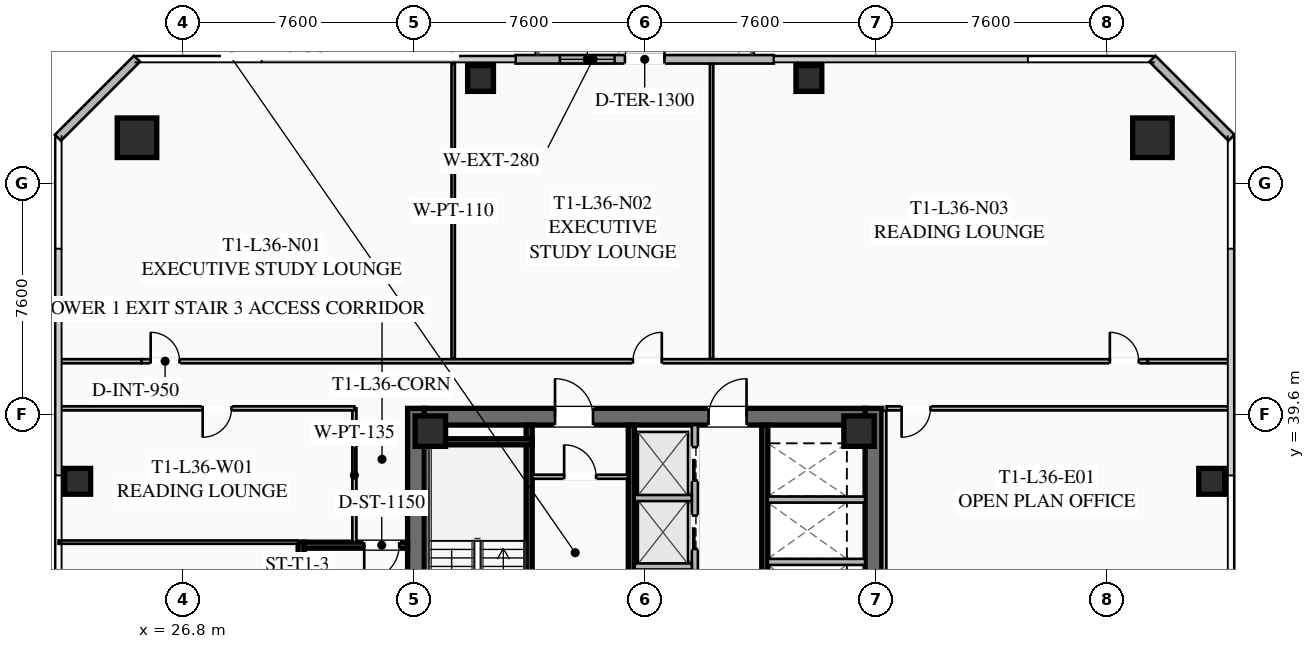
"""IFC4 building model, lengths in metres.
Left out: names, types, materials, properties, quantities, classifications, styles, units other than length and angle.
Written with IfcOpenShell. Run it as: python <this file> out.ifc"""

import sys

from ifc_helpers import new_model, si_unit, direction, frame, frame_2d, origin, origin_2d, place, context, subcontext, project, spatial, rectangle, hollow_rectangle, extrude, element, fill, save


model = new_model("IFC4")
c1 = context("Model", 3, precision=1e-05, world=origin(), true_north=direction((0.0, 1.0)))
c2 = subcontext(c1, "Body", "Model", "MODEL_VIEW")
j1 = project(units=[si_unit("LENGTHUNIT", "METRE"), si_unit("PLANEANGLEUNIT", "RADIAN")], contexts=[c1])
p1 = place(None, origin())
s1 = spatial("IfcSite", under=j1, at=p1, CompositionType="ELEMENT")
p2 = place(p1, origin())
s2 = spatial("IfcBuilding", under=s1, at=p2, CompositionType="ELEMENT")
p3 = place(p2, frame((0.0, 0.0, 135.7)))
s3 = spatial("IfcBuildingStorey", under=s2, at=p3, CompositionType="ELEMENT", Elevation=135.7)
for number, where, z_axis, x_axis in (
    (1, (34.475, 24.2, 0.0), (0.0, 0.0, 1.0), (0.0, 1.0, 0.0)),
    (2, (49.525, 39.8, 0.0), (0.0, 0.0, 1.0), (0.0, -1.0, 0.0)),
):
    element("IfcWall", number, at=place(p3, frame(where, z_axis=z_axis, x_axis=x_axis)), inside=s3, PredefinedType="SHEAR", context=c2, shape_type="SweptSolid", body=[
        extrude(rectangle(XDim=15.6, YDim=0.55, at=frame_2d((7.8, 0.0))), origin(), (0.0, 0.0, 1.0), 3.55),
    ])
p4 = place(p3, frame((34.75, 39.525, 0.0), z_axis=(0.0, 0.0, 1.0), x_axis=(1.0, 0.0, 0.0)))
e3 = element("IfcWall", 3, at=p4, inside=s3, PredefinedType="SHEAR", context=c2, shape_type="SweptSolid", body=[
    extrude(rectangle(XDim=14.5, YDim=0.55, at=frame_2d((7.25, 0.0))), origin(), (0.0, 0.0, 1.0), 3.55),
])
p5 = place(p4, frame((4.3, 0.0, 0.0)))
e4 = element("IfcOpeningElement", 4, at=p5, cuts=e3, PredefinedType="OPENING", context=c2, shape_type="SweptSolid", body=[
    extrude(rectangle(XDim=1.25, YDim=2.25, at=frame_2d((0.625, 1.125))), frame((0.0, 0.285, 0.0), z_axis=(0.0, -1.0, 0.0), x_axis=(1.0, 0.0, 0.0)), (0.0, 0.0, 1.0), 0.57),
])
p6 = place(p4, frame((9.35, 0.0, 0.0)))
e5 = element("IfcOpeningElement", 5, at=p6, cuts=e3, PredefinedType="OPENING", context=c2, shape_type="SweptSolid", body=[
    extrude(rectangle(XDim=1.25, YDim=2.25, at=frame_2d((0.625, 1.125))), frame((0.0, 0.285, 0.0), z_axis=(0.0, -1.0, 0.0), x_axis=(1.0, 0.0, 0.0)), (0.0, 0.0, 1.0), 0.57),
])
for number, where, z_axis, x_axis in (
    (6, (49.05, 39.05, 0.0), (0.0, 0.0, 1.0), (1.0, 0.0, 0.0)),
    (7, (34.95, 39.05, 0.0), (0.0, 0.0, 1.0), (1.0, 0.0, 0.0)),
):
    element("IfcColumn", number, at=place(p3, frame(where, z_axis=z_axis, x_axis=x_axis)), inside=s3, PredefinedType="COLUMN", context=c2, shape_type="SweptSolid", body=[
        extrude(hollow_rectangle(XDim=1.0, YDim=1.0, WallThickness=0.04, at=origin_2d()), origin(), (0.0, 0.0, 1.0), 3.37),
    ])
for number, where, z_axis, x_axis in (
    (8, (58.7, 48.7, 0.0), (0.0, 0.0, 1.0), (1.0, 0.0, 0.0)),
    (9, (25.3, 48.7, 0.0), (0.0, 0.0, 1.0), (1.0, 0.0, 0.0)),
):
    element("IfcColumn", number, at=place(p3, frame(where, z_axis=z_axis, x_axis=x_axis)), inside=s3, PredefinedType="COLUMN", context=c2, shape_type="SweptSolid", body=[
        extrude(hollow_rectangle(XDim=1.3, YDim=1.3, WallThickness=0.05, at=origin_2d()), origin(), (0.0, 0.0, 1.0), 3.37),
    ])
for number, where, z_axis, x_axis in (
    (10, (60.65, 37.4, 0.0), (0.0, 0.0, 1.0), (1.0, 0.0, 0.0)),
    (11, (47.4, 50.65, 0.0), (0.0, 0.0, 1.0), (1.0, 0.0, 0.0)),
    (12, (36.6, 50.65, 0.0), (0.0, 0.0, 1.0), (1.0, 0.0, 0.0)),
    (13, (23.35, 37.4, 0.0), (0.0, 0.0, 1.0), (1.0, 0.0, 0.0)),
):
    element("IfcColumn", number, at=place(p3, frame(where, z_axis=z_axis, x_axis=x_axis)), inside=s3, PredefinedType="COLUMN", context=c2, shape_type="SweptSolid", body=[
        extrude(hollow_rectangle(XDim=0.85, YDim=0.85, WallThickness=0.035, at=origin_2d()), origin(), (0.0, 0.0, 1.0), 3.37),
    ])
p7 = place(p3, frame((37.75, 51.28, 0.0), z_axis=(0.0, 0.0, 1.0), x_axis=(1.0, 0.0, 0.0)))
e14 = element("IfcWall", 14, at=p7, inside=s3, PredefinedType="SOLIDWALL", context=c2, shape_type="SweptSolid", body=[
    extrude(rectangle(XDim=8.5, YDim=0.28, at=frame_2d((4.25, 0.0))), origin(), (0.0, 0.0, 1.0), 3.37),
])
p8 = place(p7, frame((3.6, 0.0, 0.0)))
e15 = element("IfcOpeningElement", 15, at=p8, cuts=e14, PredefinedType="OPENING", context=c2, shape_type="SweptSolid", body=[
    extrude(rectangle(XDim=1.3, YDim=2.15, at=frame_2d((0.65, 1.075))), frame((0.0, 0.15, 0.0), z_axis=(0.0, -1.0, 0.0), x_axis=(1.0, 0.0, 0.0)), (0.0, 0.0, 1.0), 0.3),
])
p9 = place(p7, frame((1.46, 0.0, 0.85)))
e16 = element("IfcOpeningElement", 16, at=p9, cuts=e14, PredefinedType="OPENING", context=c2, shape_type="SweptSolid", body=[
    extrude(rectangle(XDim=1.8, YDim=1.92, at=frame_2d((0.9, 0.96))), frame((0.0, 0.15, 0.0), z_axis=(0.0, -1.0, 0.0), x_axis=(1.0, 0.0, 0.0)), (0.0, 0.0, 1.0), 0.3),
])
for number, where, z_axis, x_axis in (
    (17, (22.7, 48.7, 0.0), (0.0, 0.0, 1.0), (0.707, 0.707, 0.0)),
    (18, (58.7, 51.3, 0.0), (0.0, 0.0, 1.0), (0.707, -0.707, 0.0)),
):
    element("IfcWall", number, at=place(p3, frame(where, z_axis=z_axis, x_axis=x_axis)), inside=s3, PredefinedType="SOLIDWALL", context=c2, shape_type="SweptSolid", body=[
        extrude(rectangle(XDim=3.677, YDim=0.28, at=frame_2d((1.838, 0.0))), origin(), (0.0, 0.0, 1.0), 3.37),
    ])
p10 = place(p3, frame((38.2, 31.2, 0.0), z_axis=(0.0, 0.0, 1.0), x_axis=(0.0, 1.0, 0.0)))
e19 = element("IfcWall", 19, at=p10, inside=s3, PredefinedType="SHEAR", context=c2, shape_type="SweptSolid", body=[
    extrude(rectangle(XDim=8.05, YDim=0.2, at=frame_2d((4.025, 0.0))), origin(), (0.0, 0.0, 1.0), 3.37),
])
p11 = place(p10, frame((0.45, 0.0, 0.0)))
e20 = element("IfcOpeningElement", 20, at=p11, cuts=e19, PredefinedType="OPENING", context=c2, shape_type="SweptSolid", body=[
    extrude(rectangle(XDim=1.15, YDim=2.2, at=frame_2d((0.575, 1.1))), frame((0.0, 0.11, 0.0), z_axis=(0.0, -1.0, 0.0), x_axis=(1.0, 0.0, 0.0)), (0.0, 0.0, 1.0), 0.22),
])
p12 = place(p3, frame((34.75, 38.7, 0.0), z_axis=(0.0, 0.0, 1.0), x_axis=(1.0, 0.0, 0.0)))
e21 = element("IfcWall", 21, at=p12, inside=s3, PredefinedType="SHEAR", context=c2, shape_type="SweptSolid", body=[
    extrude(rectangle(XDim=3.55, YDim=0.2, at=frame_2d((1.775, 0.0))), origin(), (0.0, 0.0, 1.0), 3.37),
])
p13 = place(p3, frame((41.56, 24.75, 0.0), z_axis=(0.0, 0.0, 1.0), x_axis=(0.0, 1.0, 0.0)))
e22 = element("IfcWall", 22, at=p13, inside=s3, PredefinedType="SHEAR", context=c2, shape_type="SweptSolid", body=[
    extrude(rectangle(XDim=14.5, YDim=0.2, at=frame_2d((7.25, 0.0))), origin(), (0.0, 0.0, 1.0), 3.37),
])
p14 = place(p3, frame((45.95, 39.25, 0.0), z_axis=(0.0, 0.0, 1.0), x_axis=(0.0, -1.0, 0.0)))
e23 = element("IfcWall", 23, at=p14, inside=s3, PredefinedType="SHEAR", context=c2, shape_type="SweptSolid", body=[
    extrude(rectangle(XDim=6.45, YDim=0.2, at=frame_2d((3.225, 0.0))), origin(), (0.0, 0.0, 1.0), 3.37),
])
for number, where, z_axis, x_axis in (
    (24, (46.05, 34.75, 0.0), (0.0, 0.0, 1.0), (1.0, 0.0, 0.0)),
    (25, (46.05, 36.8, 0.0), (0.0, 0.0, 1.0), (1.0, 0.0, 0.0)),
):
    element("IfcWall", number, at=place(p3, frame(where, z_axis=z_axis, x_axis=x_axis)), inside=s3, PredefinedType="SOLIDWALL", context=c2, shape_type="SweptSolid", body=[
        extrude(rectangle(XDim=3.2, YDim=0.2, at=frame_2d((1.6, 0.0))), origin(), (0.0, 0.0, 1.0), 3.37),
    ])
p15 = place(p3, frame((38.3, 37.55, 0.0), z_axis=(0.0, 0.0, 1.0), x_axis=(1.0, 0.0, 0.0)))
e26 = element("IfcWall", 26, at=p15, inside=s3, PredefinedType="PARTITIONING", context=c2, shape_type="SweptSolid", body=[
    extrude(rectangle(XDim=3.15, YDim=0.135, at=frame_2d((1.575, 0.0))), origin(), (0.0, 0.0, 1.0), 2.723),
])
p16 = place(p15, frame((1.05, 0.0, 0.0)))
e27 = element("IfcOpeningElement", 27, at=p16, cuts=e26, PredefinedType="OPENING", context=c2, shape_type="SweptSolid", body=[
    extrude(rectangle(XDim=1.05, YDim=2.2, at=frame_2d((0.525, 1.1))), frame((0.0, 0.077, 0.0), z_axis=(0.0, -1.0, 0.0), x_axis=(1.0, 0.0, 0.0)), (0.0, 0.0, 1.0), 0.155),
])
p17 = place(p3, frame((43.65, 32.35, 0.0), z_axis=(0.0, 0.0, 1.0), x_axis=(0.0, 1.0, 0.0)))
e28 = element("IfcWall", 28, at=p17, inside=s3, PredefinedType="SOLIDWALL", context=c2, shape_type="SweptSolid", body=[
    extrude(rectangle(XDim=6.9, YDim=0.2, at=frame_2d((3.45, 0.0))), origin(), (0.0, 0.0, 1.0), 3.37),
])
p18 = place(p17, frame((0.575, 0.0, 0.0)))
e29 = element("IfcOpeningElement", 29, at=p18, cuts=e28, PredefinedType="OPENING", context=c2, shape_type="SweptSolid", body=[
    extrude(rectangle(XDim=1.1, YDim=2.2, at=frame_2d((0.55, 1.1))), frame((0.0, 0.11, 0.0), z_axis=(0.0, -1.0, 0.0), x_axis=(1.0, 0.0, 0.0)), (0.0, 0.0, 1.0), 0.22),
])
p19 = place(p17, frame((2.825, 0.0, 0.0)))
e30 = element("IfcOpeningElement", 30, at=p19, cuts=e28, PredefinedType="OPENING", context=c2, shape_type="SweptSolid", body=[
    extrude(rectangle(XDim=1.1, YDim=2.2, at=frame_2d((0.55, 1.1))), frame((0.0, 0.11, 0.0), z_axis=(0.0, -1.0, 0.0), x_axis=(1.0, 0.0, 0.0)), (0.0, 0.0, 1.0), 0.22),
])
p20 = place(p17, frame((5.075, 0.0, 0.0)))
e31 = element("IfcOpeningElement", 31, at=p20, cuts=e28, PredefinedType="OPENING", context=c2, shape_type="SweptSolid", body=[
    extrude(rectangle(XDim=1.1, YDim=2.2, at=frame_2d((0.55, 1.1))), frame((0.0, 0.11, 0.0), z_axis=(0.0, -1.0, 0.0), x_axis=(1.0, 0.0, 0.0)), (0.0, 0.0, 1.0), 0.22),
])
for number, where, z_axis, x_axis in (
    (32, (41.67, 34.6, 0.0), (0.0, 0.0, 1.0), (1.0, 0.0, 0.0)),
    (33, (41.67, 36.85, 0.0), (0.0, 0.0, 1.0), (1.0, 0.0, 0.0)),
):
    element("IfcWall", number, at=place(p3, frame(where, z_axis=z_axis, x_axis=x_axis)), inside=s3, PredefinedType="SOLIDWALL", context=c2, shape_type="SweptSolid", body=[
        extrude(rectangle(XDim=1.88, YDim=0.2, at=frame_2d((0.94, 0.0))), origin(), (0.0, 0.0, 1.0), 3.37),
    ])
p21 = place(p3, frame((30.7, 28.6, 0.0), z_axis=(0.0, 0.0, 1.0), x_axis=(0.0, 1.0, 0.0)))
e34 = element("IfcWall", 34, at=p21, inside=s3, PredefinedType="SHEAR", context=c2, shape_type="SweptSolid", body=[
    extrude(rectangle(XDim=6.8, YDim=0.2, at=frame_2d((3.4, 0.0))), origin(), (0.0, 0.0, 1.0), 3.37),
])
p22 = place(p3, frame((34.2, 35.3, 0.0), z_axis=(0.0, 0.0, 1.0), x_axis=(-1.0, 0.0, 0.0)))
e35 = element("IfcWall", 35, at=p22, inside=s3, PredefinedType="SHEAR", context=c2, shape_type="SweptSolid", body=[
    extrude(rectangle(XDim=3.4, YDim=0.2, at=frame_2d((1.7, 0.0))), origin(), (0.0, 0.0, 1.0), 3.37),
])
p23 = place(p22, frame((0.275, 0.0, 0.0)))
e36 = element("IfcOpeningElement", 36, at=p23, cuts=e35, PredefinedType="OPENING", context=c2, shape_type="SweptSolid", body=[
    extrude(rectangle(XDim=1.15, YDim=2.2, at=frame_2d((0.575, 1.1))), frame((0.0, 0.11, 0.0), z_axis=(0.0, -1.0, 0.0), x_axis=(1.0, 0.0, 0.0)), (0.0, 0.0, 1.0), 0.22),
])
p24 = place(p3, frame((32.45, 35.4, 0.0), z_axis=(0.0, 0.0, 1.0), x_axis=(0.0, 1.0, 0.0)))
e37 = element("IfcWall", 37, at=p24, inside=s3, PredefinedType="PARTITIONING", context=c2, shape_type="SweptSolid", body=[
    extrude(rectangle(XDim=4.4, YDim=0.135, at=frame_2d((2.2, 0.0))), origin(), (0.0, 0.0, 1.0), 2.723),
])
p25 = place(p3, frame((25.45, 41.35, 0.0), z_axis=(0.0, 0.0, 1.0), x_axis=(1.0, 0.0, 0.0)))
e38 = element("IfcWall", 38, at=p25, inside=s3, PredefinedType="PARTITIONING", context=c2, shape_type="SweptSolid", body=[
    extrude(rectangle(XDim=33.1, YDim=0.135, at=frame_2d((16.55, 0.0))), origin(), (0.0, 0.0, 1.0), 2.723),
])
p26 = place(p25, frame((0.3, 0.0, 0.0)))
e39 = element("IfcOpeningElement", 39, at=p26, cuts=e38, PredefinedType="OPENING", context=c2, shape_type="SweptSolid", body=[
    extrude(rectangle(XDim=0.95, YDim=2.05, at=frame_2d((0.475, 1.025))), frame((0.0, 0.077, 0.0), z_axis=(0.0, -1.0, 0.0), x_axis=(1.0, 0.0, 0.0)), (0.0, 0.0, 1.0), 0.155),
])
p27 = place(p25, frame((16.163, 0.0, 0.0)))
e40 = element("IfcOpeningElement", 40, at=p27, cuts=e38, PredefinedType="OPENING", context=c2, shape_type="SweptSolid", body=[
    extrude(rectangle(XDim=0.95, YDim=2.05, at=frame_2d((0.475, 1.025))), frame((0.0, 0.077, 0.0), z_axis=(0.0, -1.0, 0.0), x_axis=(1.0, 0.0, 0.0)), (0.0, 0.0, 1.0), 0.155),
])
p28 = place(p25, frame((31.85, 0.0, 0.0)))
e41 = element("IfcOpeningElement", 41, at=p28, cuts=e38, PredefinedType="OPENING", context=c2, shape_type="SweptSolid", body=[
    extrude(rectangle(XDim=0.95, YDim=2.05, at=frame_2d((0.475, 1.025))), frame((0.0, 0.077, 0.0), z_axis=(0.0, -1.0, 0.0), x_axis=(1.0, 0.0, 0.0)), (0.0, 0.0, 1.0), 0.155),
])
for number, where, z_axis, x_axis in (
    (42, (22.72, 41.35, 0.0), (0.0, 0.0, 1.0), (1.0, 0.0, 0.0)),
    (43, (58.55, 41.35, 0.0), (0.0, 0.0, 1.0), (1.0, 0.0, 0.0)),
):
    element("IfcWall", number, at=place(p3, frame(where, z_axis=z_axis, x_axis=x_axis)), inside=s3, PredefinedType="PARTITIONING", context=c2, shape_type="SweptSolid", body=[
        extrude(rectangle(XDim=2.73, YDim=0.135, at=frame_2d((1.365, 0.0))), origin(), (0.0, 0.0, 1.0), 2.723),
    ])
for number, where, z_axis, x_axis in (
    (44, (35.7, 41.43, 0.0), (0.0, 0.0, 1.0), (0.0, 1.0, 0.0)),
    (45, (44.2, 41.43, 0.0), (0.0, 0.0, 1.0), (0.0, 1.0, 0.0)),
):
    element("IfcWall", number, at=place(p3, frame(where, z_axis=z_axis, x_axis=x_axis)), inside=s3, PredefinedType="PARTITIONING", context=c2, shape_type="SweptSolid", body=[
        extrude(rectangle(XDim=9.7, YDim=0.11, at=frame_2d((4.85, 0.0))), origin(), (0.0, 0.0, 1.0), 2.723),
    ])
p29 = place(p3, frame((49.88, 39.72, 0.0), z_axis=(0.0, 0.0, 1.0), x_axis=(0.0, -1.0, 0.0)))
e46 = element("IfcWall", 46, at=p29, inside=s3, PredefinedType="PARTITIONING", context=c2, shape_type="SweptSolid", body=[
    extrude(rectangle(XDim=15.44, YDim=0.135, at=frame_2d((7.72, 0.0))), origin(), (0.0, 0.0, 1.0), 2.723),
])
p30 = place(p3, frame((61.28, 39.8, 0.0), z_axis=(0.0, 0.0, 1.0), x_axis=(-1.0, 0.0, 0.0)))
e47 = element("IfcWall", 47, at=p30, inside=s3, PredefinedType="PARTITIONING", context=c2, shape_type="SweptSolid", body=[
    extrude(rectangle(XDim=11.32, YDim=0.135, at=frame_2d((5.66, 0.0))), origin(), (0.0, 0.0, 1.0), 2.723),
])
p31 = place(p30, frame((9.88, 0.0, 0.0)))
e48 = element("IfcOpeningElement", 48, at=p31, cuts=e47, PredefinedType="OPENING", context=c2, shape_type="SweptSolid", body=[
    extrude(rectangle(XDim=0.95, YDim=2.05, at=frame_2d((0.475, 1.025))), frame((0.0, 0.077, 0.0), z_axis=(0.0, -1.0, 0.0), x_axis=(1.0, 0.0, 0.0)), (0.0, 0.0, 1.0), 0.155),
])
p32 = place(p3, frame((32.45, 39.8, 0.0), z_axis=(0.0, 0.0, 1.0), x_axis=(-1.0, 0.0, 0.0)))
e49 = element("IfcWall", 49, at=p32, inside=s3, PredefinedType="PARTITIONING", context=c2, shape_type="SweptSolid", body=[
    extrude(rectangle(XDim=9.73, YDim=0.135, at=frame_2d((4.865, 0.0))), origin(), (0.0, 0.0, 1.0), 2.723),
])
p33 = place(p32, frame((4.04, 0.0, 0.0)))
e50 = element("IfcOpeningElement", 50, at=p33, cuts=e49, PredefinedType="OPENING", context=c2, shape_type="SweptSolid", body=[
    extrude(rectangle(XDim=0.95, YDim=2.05, at=frame_2d((0.475, 1.025))), frame((0.0, 0.077, 0.0), z_axis=(0.0, -1.0, 0.0), x_axis=(1.0, 0.0, 0.0)), (0.0, 0.0, 1.0), 0.155),
])
p34 = place(p3, frame((30.6, 35.4, 0.0), z_axis=(0.0, 0.0, 1.0), x_axis=(-1.0, 0.0, 0.0)))
e51 = element("IfcWall", 51, at=p34, inside=s3, PredefinedType="PARTITIONING", context=c2, shape_type="SweptSolid", body=[
    extrude(rectangle(XDim=7.88, YDim=0.11, at=frame_2d((3.94, 0.0))), origin(), (0.0, 0.0, 1.0), 2.723),
])
p35 = place(p8, origin())
e52 = element("IfcDoor", 52, at=p35, inside=s3, OperationType="SINGLE_SWING_RIGHT", PredefinedType="DOOR", context=c2, shape_type="SweptSolid", body=[
    extrude(rectangle(XDim=1.3, YDim=2.15, at=frame_2d((0.65, 1.075))), frame((0.0, 0.025, 0.0), z_axis=(0.0, -1.0, 0.0), x_axis=(1.0, 0.0, 0.0)), (0.0, 0.0, 1.0), 0.05),
])
fill(e15, e52)
p36 = place(p9, origin())
e53 = element("IfcWindow", 53, at=p36, inside=s3, PartitioningType="SINGLE_PANEL", PredefinedType="WINDOW", context=c2, shape_type="SweptSolid", body=[
    extrude(rectangle(XDim=1.8, YDim=1.92, at=frame_2d((0.9, 0.96))), frame((0.0, 0.03, 0.0), z_axis=(0.0, -1.0, 0.0), x_axis=(1.0, 0.0, 0.0)), (0.0, 0.0, 1.0), 0.06),
])
fill(e16, e53)
p37 = place(p5, origin())
e54 = element("IfcDoor", 54, at=p37, inside=s3, OperationType="SINGLE_SWING_LEFT", PredefinedType="DOOR", context=c2, shape_type="SweptSolid", body=[
    extrude(rectangle(XDim=1.25, YDim=2.25, at=frame_2d((0.625, 1.125))), frame((0.0, 0.025, 0.0), z_axis=(0.0, -1.0, 0.0), x_axis=(1.0, 0.0, 0.0)), (0.0, 0.0, 1.0), 0.05),
])
fill(e4, e54)
p38 = place(p6, origin())
e55 = element("IfcDoor", 55, at=p38, inside=s3, OperationType="SINGLE_SWING_RIGHT", PredefinedType="DOOR", context=c2, shape_type="SweptSolid", body=[
    extrude(rectangle(XDim=1.25, YDim=2.25, at=frame_2d((0.625, 1.125))), frame((0.0, 0.025, 0.0), z_axis=(0.0, -1.0, 0.0), x_axis=(1.0, 0.0, 0.0)), (0.0, 0.0, 1.0), 0.05),
])
fill(e5, e55)
p39 = place(p16, origin())
e56 = element("IfcDoor", 56, at=p39, inside=s3, OperationType="SINGLE_SWING_LEFT", PredefinedType="DOOR", context=c2, shape_type="SweptSolid", body=[
    extrude(rectangle(XDim=1.05, YDim=2.2, at=frame_2d((0.525, 1.1))), frame((0.0, 0.025, 0.0), z_axis=(0.0, -1.0, 0.0), x_axis=(1.0, 0.0, 0.0)), (0.0, 0.0, 1.0), 0.05),
])
fill(e27, e56)
p40 = place(p23, origin())
e57 = element("IfcDoor", 57, at=p40, inside=s3, OperationType="SINGLE_SWING_RIGHT", PredefinedType="DOOR", context=c2, shape_type="SweptSolid", body=[
    extrude(rectangle(XDim=1.15, YDim=2.2, at=frame_2d((0.575, 1.1))), frame((0.0, 0.025, 0.0), z_axis=(0.0, -1.0, 0.0), x_axis=(1.0, 0.0, 0.0)), (0.0, 0.0, 1.0), 0.05),
])
fill(e36, e57)
p41 = place(p26, origin())
e58 = element("IfcDoor", 58, at=p41, inside=s3, OperationType="SINGLE_SWING_LEFT", PredefinedType="DOOR", context=c2, shape_type="SweptSolid", body=[
    extrude(rectangle(XDim=0.95, YDim=2.05, at=frame_2d((0.475, 1.025))), frame((0.0, 0.025, 0.0), z_axis=(0.0, -1.0, 0.0), x_axis=(1.0, 0.0, 0.0)), (0.0, 0.0, 1.0), 0.05),
])
fill(e39, e58)
p42 = place(p27, origin())
e59 = element("IfcDoor", 59, at=p42, inside=s3, OperationType="SINGLE_SWING_RIGHT", PredefinedType="DOOR", context=c2, shape_type="SweptSolid", body=[
    extrude(rectangle(XDim=0.95, YDim=2.05, at=frame_2d((0.475, 1.025))), frame((0.0, 0.025, 0.0), z_axis=(0.0, -1.0, 0.0), x_axis=(1.0, 0.0, 0.0)), (0.0, 0.0, 1.0), 0.05),
])
fill(e40, e59)
p43 = place(p28, origin())
e60 = element("IfcDoor", 60, at=p43, inside=s3, OperationType="SINGLE_SWING_LEFT", PredefinedType="DOOR", context=c2, shape_type="SweptSolid", body=[
    extrude(rectangle(XDim=0.95, YDim=2.05, at=frame_2d((0.475, 1.025))), frame((0.0, 0.025, 0.0), z_axis=(0.0, -1.0, 0.0), x_axis=(1.0, 0.0, 0.0)), (0.0, 0.0, 1.0), 0.05),
])
fill(e41, e60)
p44 = place(p31, origin())
e61 = element("IfcDoor", 61, at=p44, inside=s3, OperationType="SINGLE_SWING_RIGHT", PredefinedType="DOOR", context=c2, shape_type="SweptSolid", body=[
    extrude(rectangle(XDim=0.95, YDim=2.05, at=frame_2d((0.475, 1.025))), frame((0.0, 0.025, 0.0), z_axis=(0.0, -1.0, 0.0), x_axis=(1.0, 0.0, 0.0)), (0.0, 0.0, 1.0), 0.05),
])
fill(e48, e61)
p45 = place(p33, origin())
e62 = element("IfcDoor", 62, at=p45, inside=s3, OperationType="SINGLE_SWING_RIGHT", PredefinedType="DOOR", context=c2, shape_type="SweptSolid", body=[
    extrude(rectangle(XDim=0.95, YDim=2.05, at=frame_2d((0.475, 1.025))), frame((0.0, 0.025, 0.0), z_axis=(0.0, -1.0, 0.0), x_axis=(1.0, 0.0, 0.0)), (0.0, 0.0, 1.0), 0.05),
])
fill(e50, e62)
p46 = place(p19, origin())
e63 = element("IfcDoor", 63, at=p46, inside=s3, OperationType="SLIDING_TO_LEFT", PredefinedType="DOOR", context=c2, shape_type="SweptSolid", body=[
    extrude(rectangle(XDim=1.1, YDim=2.2, at=frame_2d((0.55, 1.1))), frame((0.0, 0.025, 0.0), z_axis=(0.0, -1.0, 0.0), x_axis=(1.0, 0.0, 0.0)), (0.0, 0.0, 1.0), 0.05),
])
fill(e30, e63)
p47 = place(p20, origin())
e64 = element("IfcDoor", 64, at=p47, inside=s3, OperationType="SLIDING_TO_LEFT", PredefinedType="DOOR", context=c2, shape_type="SweptSolid", body=[
    extrude(rectangle(XDim=1.1, YDim=2.2, at=frame_2d((0.55, 1.1))), frame((0.0, 0.025, 0.0), z_axis=(0.0, -1.0, 0.0), x_axis=(1.0, 0.0, 0.0)), (0.0, 0.0, 1.0), 0.05),
])
fill(e31, e64)
save(model, sys.argv[1])
